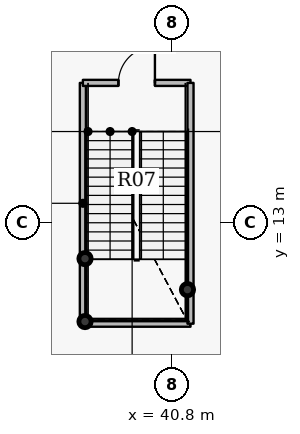
"""IFC4 building model, lengths in metres.
Left out: names, types, materials, properties, quantities, classifications, styles, units other than length and angle.
Written with IfcOpenShell. Run it as: python <this file> out.ifc"""

import sys

from ifc_helpers import new_model, si_unit, direction, frame, frame_2d, origin, origin_2d, place, context, subcontext, project, spatial, rectangle, hollow_circle, extrude, source, transform, mapped, element, fill, save


model = new_model("IFC4")
c1 = context("Model", 3, precision=1e-05, world=origin(), true_north=direction((0.0, 1.0)))
c2 = subcontext(c1, "Body", "Model", "MODEL_VIEW")
j1 = project(units=[si_unit("LENGTHUNIT", "METRE"), si_unit("PLANEANGLEUNIT", "RADIAN")], contexts=[c1])
p1 = place(None, origin())
s1 = spatial("IfcSite", under=j1, at=p1, CompositionType="ELEMENT")
p2 = place(p1, origin())
s2 = spatial("IfcBuilding", under=s1, at=p2, CompositionType="ELEMENT")
p3 = place(p2, frame((0.0, 0.0, -4.5)))
s3 = spatial("IfcBuildingStorey", under=s2, at=p3, CompositionType="ELEMENT", Elevation=-4.5)
for number, where, z_axis, x_axis in (
    (1, (37.95, 9.75, 0.0), (0.0, 0.0, 1.0), (1.0, 0.0, 0.0)),
    (2, (37.95, 11.82, 0.0), (0.0, 0.0, 1.0), (1.0, 0.0, 0.0)),
    (3, (41.32, 10.8, 0.0), (0.0, 0.0, 1.0), (1.0, 0.0, 0.0)),
):
    element("IfcColumn", number, at=place(p3, frame(where, z_axis=z_axis, x_axis=x_axis)), inside=s3, PredefinedType="COLUMN", context=c2, shape_type="SweptSolid", body=[
        extrude(hollow_circle(Radius=0.203, WallThickness=0.016, at=origin_2d()), origin(), (0.0, 0.0, 1.0), 4.5),
    ])
p4 = place(p3, frame((37.88, 9.68, 0.0), z_axis=(0.0, 0.0, 1.0), x_axis=(0.0, 1.0, 0.0)))
e4 = element("IfcWall", 4, at=p4, inside=s3, PredefinedType="PARTITIONING", context=c2, shape_type="SweptSolid", body=[
    extrude(rectangle(XDim=7.92, YDim=0.2, at=frame_2d((3.96, 0.0))), origin(), (0.0, 0.0, 1.0), 4.2),
])
p5 = place(p3, frame((37.88, 9.68, 0.0), z_axis=(0.0, 0.0, 1.0), x_axis=(1.0, 0.0, 0.0)))
e5 = element("IfcWall", 5, at=p5, inside=s3, PredefinedType="PARTITIONING", context=c2, shape_type="SweptSolid", body=[
    extrude(rectangle(XDim=3.54, YDim=0.2, at=frame_2d((1.77, 0.0))), origin(), (0.0, 0.0, 1.0), 4.2),
])
p6 = place(p3, frame((37.88, 17.6, 0.0), z_axis=(0.0, 0.0, 1.0), x_axis=(1.0, 0.0, 0.0)))
e6 = element("IfcWall", 6, at=p6, inside=s3, PredefinedType="PARTITIONING", context=c2, shape_type="SweptSolid", body=[
    extrude(rectangle(XDim=3.54, YDim=0.2, at=frame_2d((1.77, 0.0))), origin(), (0.0, 0.0, 1.0), 3.385),
])
p7 = place(p6, frame((1.17, 0.0, 0.0)))
e7 = element("IfcOpeningElement", 7, at=p7, cuts=e6, PredefinedType="OPENING", context=c2, shape_type="SweptSolid", body=[
    extrude(rectangle(XDim=1.2, YDim=2.15, at=origin_2d()), frame((0.6, 0.11, 1.075), z_axis=(0.0, -1.0, 0.0), x_axis=(1.0, 0.0, 0.0)), (0.0, 0.0, 1.0), 0.22),
])
p8 = place(p3, frame((41.42, 9.68, 0.0), z_axis=(0.0, 0.0, 1.0), x_axis=(0.0, 1.0, 0.0)))
e8 = element("IfcWall", 8, at=p8, inside=s3, PredefinedType="PARTITIONING", context=c2, shape_type="SweptSolid", body=[
    extrude(rectangle(XDim=7.92, YDim=0.2, at=frame_2d((3.96, 0.0))), origin(), (0.0, 0.0, 1.0), 3.385),
])
m1 = source(origin(), c2, "Body", "SweptSolid", [
    extrude(rectangle(XDim=1.2, YDim=2.15, at=origin_2d()), frame((0.6, 0.025, 1.075), z_axis=(0.0, -1.0, 0.0), x_axis=(1.0, 0.0, 0.0)), (0.0, 0.0, 1.0), 0.05),
])
p9 = place(p7, origin())
e9 = element("IfcDoor", 9, at=p9, inside=s3, OperationType="SINGLE_SWING_RIGHT", PredefinedType="DOOR", context=c2, shape_type="MappedRepresentation", body=[
    mapped(m1, transform((0.0, 0.0, 0.0), x_axis=(1.0, 0.0, 0.0), y_axis=(0.0, 1.0, 0.0), z_axis=(0.0, 0.0, 1.0), scale=1.0)),
])
fill(e7, e9)
save(model, sys.argv[1])
